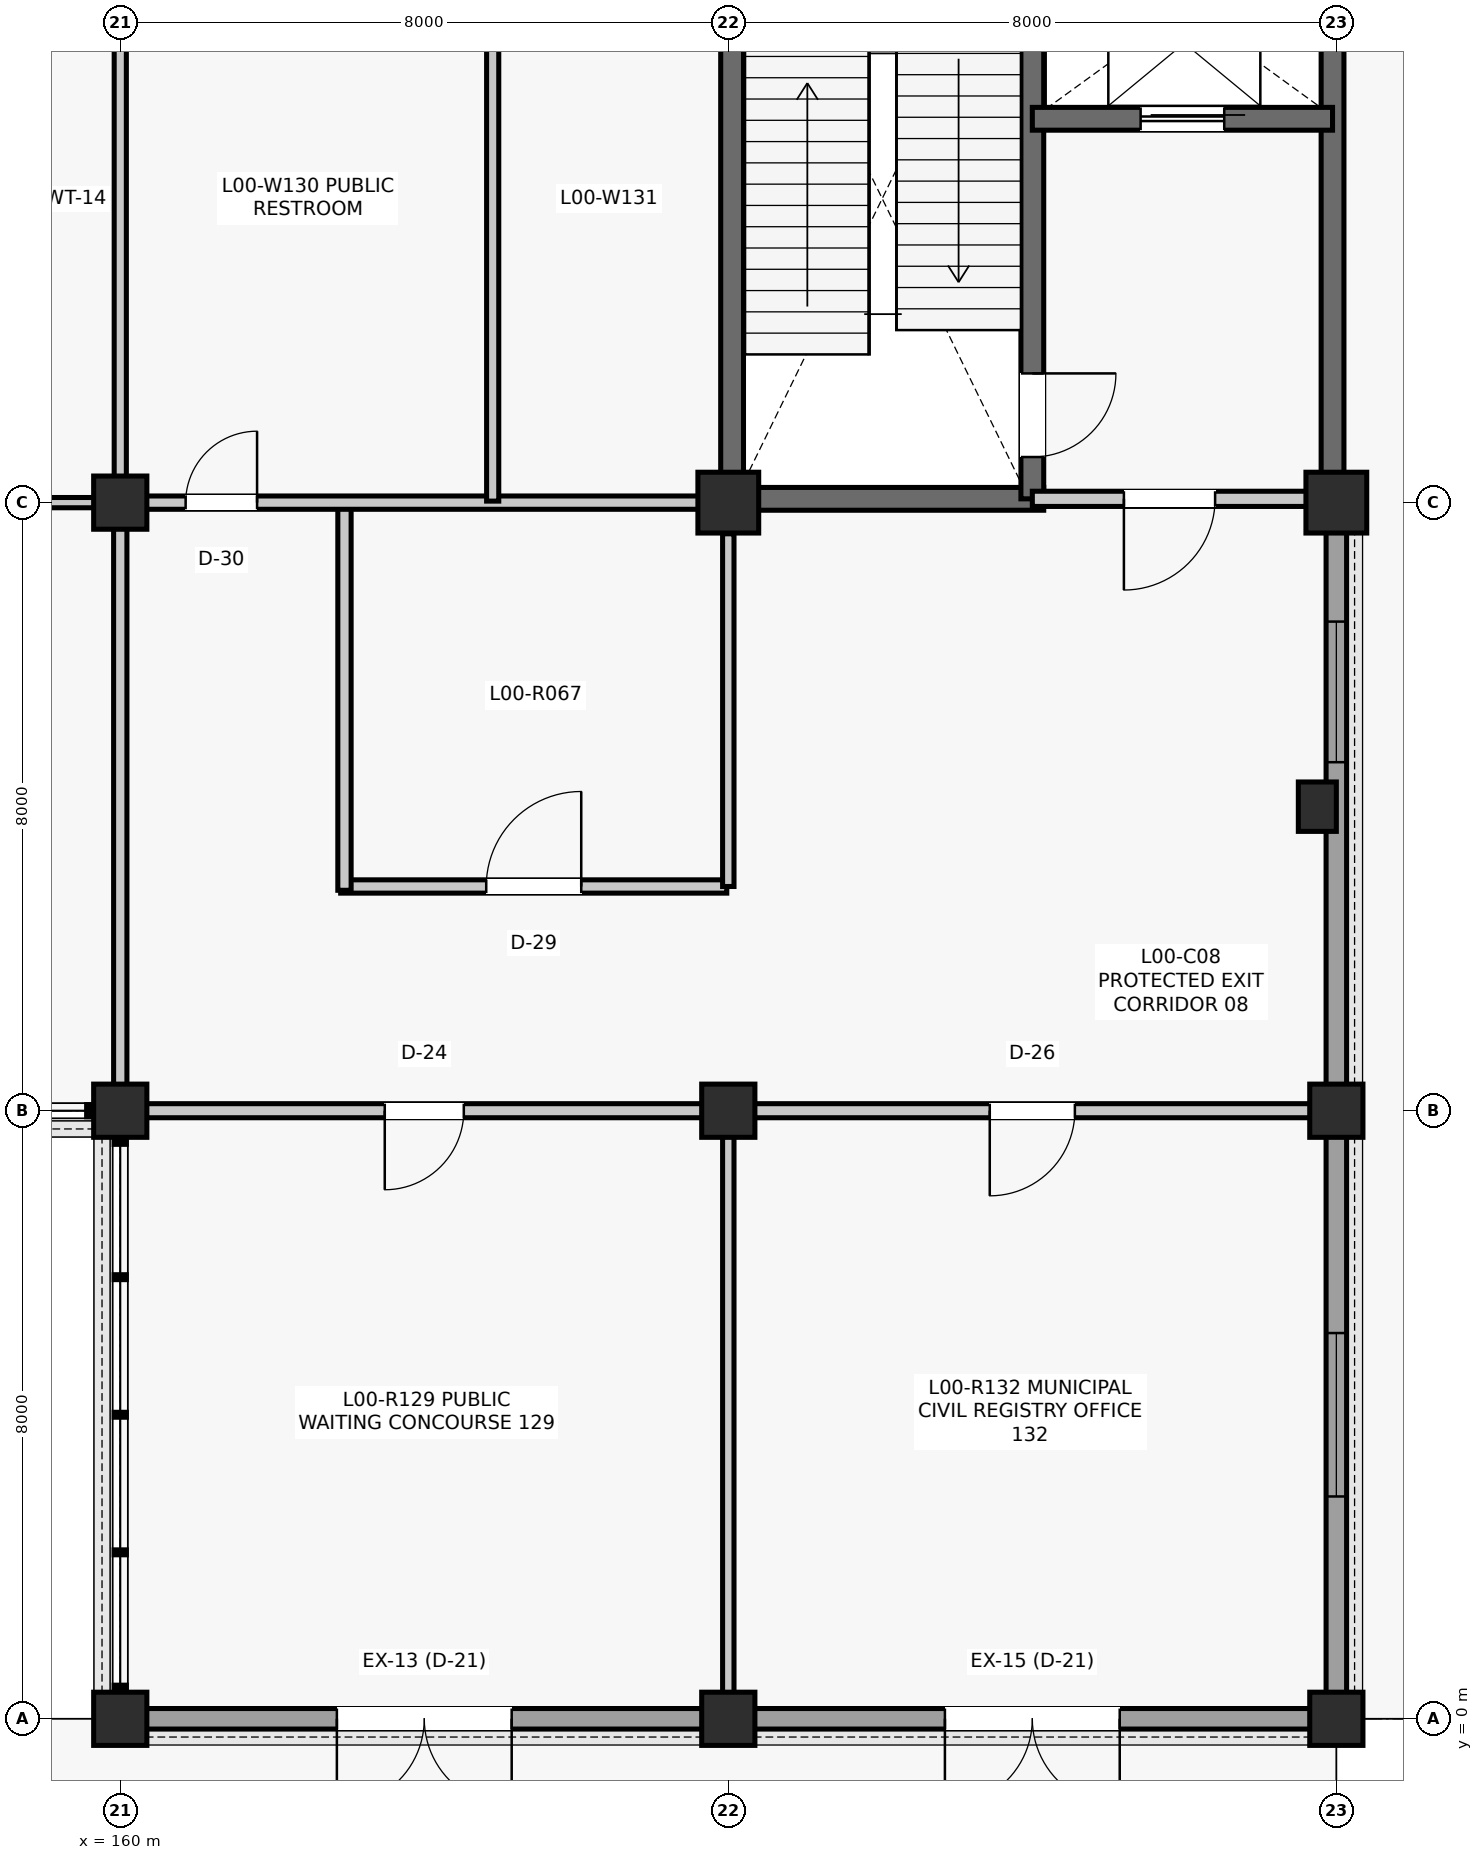
"""IFC4 building model, lengths in metres.
Left out: names, types, materials, properties, quantities, classifications, styles, units other than length and angle.
Written with IfcOpenShell. Run it as: python <this file> out.ifc"""

import sys

from ifc_helpers import new_model, si_unit, direction, frame, frame_2d, origin, origin_2d, place, context, subcontext, project, spatial, rectangle, extrude, element, fill, save


model = new_model("IFC4")
c1 = context("Model", 3, precision=1e-05, world=origin(), true_north=direction((0.0, 1.0)))
c2 = subcontext(c1, "Body", "Model", "MODEL_VIEW")
j1 = project(units=[si_unit("LENGTHUNIT", "METRE"), si_unit("PLANEANGLEUNIT", "RADIAN")], contexts=[c1])
p1 = place(None, origin())
s1 = spatial("IfcSite", under=j1, at=p1, CompositionType="ELEMENT")
p2 = place(p1, origin())
s2 = spatial("IfcBuilding", under=s1, at=p2, CompositionType="ELEMENT")
p3 = place(p2, origin())
s3 = spatial("IfcBuildingStorey", under=s2, at=p3, CompositionType="ELEMENT", Elevation=0.0)
for number, where, z_axis, x_axis in (
    (1, (160.0, 0.0, 0.0), (0.0, 0.0, 1.0), (1.0, 0.0, 0.0)),
    (2, (160.0, 8.0, 0.0), (0.0, 0.0, 1.0), (1.0, 0.0, 0.0)),
    (3, (160.0, 16.0, 0.0), (0.0, 0.0, 1.0), (1.0, 0.0, 0.0)),
    (4, (168.0, 0.0, 0.0), (0.0, 0.0, 1.0), (1.0, 0.0, 0.0)),
    (5, (168.0, 8.0, 0.0), (0.0, 0.0, 1.0), (1.0, 0.0, 0.0)),
):
    element("IfcColumn", number, at=place(p3, frame(where, z_axis=z_axis, x_axis=x_axis)), inside=s3, PredefinedType="COLUMN", context=c2, shape_type="SweptSolid", body=[
        extrude(rectangle(XDim=0.7, YDim=0.7, at=origin_2d()), origin(), (0.0, 0.0, 1.0), 5.28),
    ])
p4 = place(p3, frame((168.0, 16.0, 0.0), z_axis=(0.0, 0.0, 1.0), x_axis=(1.0, 0.0, 0.0)))
e6 = element("IfcColumn", 6, at=p4, inside=s3, PredefinedType="COLUMN", context=c2, shape_type="SweptSolid", body=[
    extrude(rectangle(XDim=0.8, YDim=0.8, at=origin_2d()), origin(), (0.0, 0.0, 1.0), 5.28),
])
for number, where, z_axis, x_axis in (
    (7, (176.0, 0.0, 0.0), (0.0, 0.0, 1.0), (1.0, 0.0, 0.0)),
    (8, (176.0, 8.0, 0.0), (0.0, 0.0, 1.0), (1.0, 0.0, 0.0)),
):
    element("IfcColumn", number, at=place(p3, frame(where, z_axis=z_axis, x_axis=x_axis)), inside=s3, PredefinedType="COLUMN", context=c2, shape_type="SweptSolid", body=[
        extrude(rectangle(XDim=0.7, YDim=0.7, at=origin_2d()), origin(), (0.0, 0.0, 1.0), 5.28),
    ])
p5 = place(p3, frame((176.0, 16.0, 0.0), z_axis=(0.0, 0.0, 1.0), x_axis=(1.0, 0.0, 0.0)))
e9 = element("IfcColumn", 9, at=p5, inside=s3, PredefinedType="COLUMN", context=c2, shape_type="SweptSolid", body=[
    extrude(rectangle(XDim=0.8, YDim=0.8, at=origin_2d()), origin(), (0.0, 0.0, 1.0), 5.28),
])
p6 = place(p3, frame((175.75, 12.0, 0.0), z_axis=(0.0, 0.0, 1.0), x_axis=(1.0, 0.0, 0.0)))
e10 = element("IfcColumn", 10, at=p6, inside=s3, PredefinedType="PILASTER", context=c2, shape_type="SweptSolid", body=[
    extrude(rectangle(XDim=0.5, YDim=0.65, at=origin_2d()), origin(), (0.0, 0.0, 1.0), 5.28),
])
p7 = place(p3, frame((160.335, 0.0, 0.0), z_axis=(0.0, 0.0, 1.0), x_axis=(1.0, 0.0, 0.0)))
e11 = element("IfcWall", 11, at=p7, inside=s3, PredefinedType="SOLIDWALL", context=c2, shape_type="SweptSolid", body=[
    extrude(rectangle(XDim=7.33, YDim=0.27, at=frame_2d((3.665, 0.0))), origin(), (0.0, 0.0, 1.0), 4.61),
])
p8 = place(p7, frame((2.515, 0.0, 0.0)))
e12 = element("IfcOpeningElement", 12, at=p8, cuts=e11, PredefinedType="OPENING", context=c2, shape_type="SweptSolid", body=[
    extrude(rectangle(XDim=2.3, YDim=2.55, at=frame_2d((1.15, 1.275))), frame((0.0, 0.145, 0.0), z_axis=(0.0, -1.0, 0.0), x_axis=(1.0, 0.0, 0.0)), (0.0, 0.0, 1.0), 0.29),
])
p9 = place(p3, frame((168.335, 0.0, 0.0), z_axis=(0.0, 0.0, 1.0), x_axis=(1.0, 0.0, 0.0)))
e13 = element("IfcWall", 13, at=p9, inside=s3, PredefinedType="SOLIDWALL", context=c2, shape_type="SweptSolid", body=[
    extrude(rectangle(XDim=7.33, YDim=0.27, at=frame_2d((3.665, 0.0))), origin(), (0.0, 0.0, 1.0), 4.674),
])
p10 = place(p9, frame((2.515, 0.0, 0.0)))
e14 = element("IfcOpeningElement", 14, at=p10, cuts=e13, PredefinedType="OPENING", context=c2, shape_type="SweptSolid", body=[
    extrude(rectangle(XDim=2.3, YDim=2.55, at=frame_2d((1.15, 1.275))), frame((0.0, 0.145, 0.0), z_axis=(0.0, -1.0, 0.0), x_axis=(1.0, 0.0, 0.0)), (0.0, 0.0, 1.0), 0.29),
])
p11 = place(p3, frame((176.0, 0.335, 0.0), z_axis=(0.0, 0.0, 1.0), x_axis=(0.0, 1.0, 0.0)))
e15 = element("IfcWall", 15, at=p11, inside=s3, PredefinedType="SOLIDWALL", context=c2, shape_type="SweptSolid", body=[
    extrude(rectangle(XDim=7.33, YDim=0.27, at=frame_2d((3.665, 0.0))), origin(), (0.0, 0.0, 1.0), 4.614),
])
p12 = place(p11, frame((2.59, 0.0, 0.9)))
e16 = element("IfcOpeningElement", 16, at=p12, cuts=e15, PredefinedType="OPENING", context=c2, shape_type="SweptSolid", body=[
    extrude(rectangle(XDim=2.15, YDim=2.8, at=frame_2d((1.075, 1.4))), frame((0.0, 0.145, 0.0), z_axis=(0.0, -1.0, 0.0), x_axis=(1.0, 0.0, 0.0)), (0.0, 0.0, 1.0), 0.29),
])
p13 = place(p3, frame((176.0, 8.335, 0.0), z_axis=(0.0, 0.0, 1.0), x_axis=(0.0, 1.0, 0.0)))
e17 = element("IfcWall", 17, at=p13, inside=s3, PredefinedType="SOLIDWALL", context=c2, shape_type="SweptSolid", body=[
    extrude(rectangle(XDim=7.28, YDim=0.27, at=frame_2d((3.64, 0.0))), origin(), (0.0, 0.0, 1.0), 4.677),
])
p14 = place(p13, frame((4.25, 0.0, 0.9)))
e18 = element("IfcOpeningElement", 18, at=p14, cuts=e17, PredefinedType="OPENING", context=c2, shape_type="SweptSolid", body=[
    extrude(rectangle(XDim=1.85, YDim=2.65, at=frame_2d((0.925, 1.325))), frame((0.0, 0.145, 0.0), z_axis=(0.0, -1.0, 0.0), x_axis=(1.0, 0.0, 0.0)), (0.0, 0.0, 1.0), 0.29),
])
for number, where, z_axis, x_axis in (
    (19, (168.05, 16.29, 0.0), (0.0, 0.0, 1.0), (0.0, 1.0, 0.0)),
    (20, (175.95, 16.29, 0.0), (0.0, 0.0, 1.0), (0.0, 1.0, 0.0)),
):
    element("IfcWall", number, at=place(p3, frame(where, z_axis=z_axis, x_axis=x_axis)), inside=s3, PredefinedType="SHEAR", context=c2, shape_type="SweptSolid", body=[
        extrude(rectangle(XDim=7.42, YDim=0.3, at=frame_2d((3.71, 0.0))), origin(), (0.0, 0.0, 1.0), 5.035),
    ])
p15 = place(p3, frame((168.29, 16.05, 0.0), z_axis=(0.0, 0.0, 1.0), x_axis=(1.0, 0.0, 0.0)))
e21 = element("IfcWall", 21, at=p15, inside=s3, PredefinedType="SHEAR", context=c2, shape_type="SweptSolid", body=[
    extrude(rectangle(XDim=3.86, YDim=0.3, at=frame_2d((1.93, 0.0))), origin(), (0.0, 0.0, 1.0), 5.035),
])
p16 = place(p3, frame((172.0, 16.05, 0.0), z_axis=(0.0, 0.0, 1.0), x_axis=(0.0, 1.0, 0.0)))
e22 = element("IfcWall", 22, at=p16, inside=s3, PredefinedType="SHEAR", context=c2, shape_type="SweptSolid", body=[
    extrude(rectangle(XDim=7.9, YDim=0.3, at=frame_2d((3.95, 0.0))), origin(), (0.0, 0.0, 1.0), 5.035),
])
p17 = place(p16, frame((0.55, 0.0, 0.0)))
e23 = element("IfcOpeningElement", 23, at=p17, cuts=e22, PredefinedType="OPENING", context=c2, shape_type="SweptSolid", body=[
    extrude(rectangle(XDim=1.1, YDim=2.15, at=frame_2d((0.55, 1.075))), frame((0.0, 0.16, 0.0), z_axis=(0.0, -1.0, 0.0), x_axis=(1.0, 0.0, 0.0)), (0.0, 0.0, 1.0), 0.32),
])
p18 = place(p3, frame((172.0, 21.05, 0.0), z_axis=(0.0, 0.0, 1.0), x_axis=(1.0, 0.0, 0.0)))
e24 = element("IfcWall", 24, at=p18, inside=s3, PredefinedType="SHEAR", context=c2, shape_type="SweptSolid", body=[
    extrude(rectangle(XDim=3.95, YDim=0.3, at=frame_2d((1.975, 0.0))), origin(), (0.0, 0.0, 1.0), 5.035),
])
p19 = place(p18, frame((1.425, 0.0, 0.0)))
e25 = element("IfcOpeningElement", 25, at=p19, cuts=e24, PredefinedType="OPENING", context=c2, shape_type="SweptSolid", body=[
    extrude(rectangle(XDim=1.1, YDim=2.2, at=frame_2d((0.55, 1.1))), frame((0.0, 0.16, 0.0), z_axis=(0.0, -1.0, 0.0), x_axis=(1.0, 0.0, 0.0)), (0.0, 0.0, 1.0), 0.32),
])
p20 = place(p3, frame((172.0, 16.05, 0.0), z_axis=(0.0, 0.0, 1.0), x_axis=(1.0, 0.0, 0.0)))
e26 = element("IfcWall", 26, at=p20, inside=s3, PredefinedType="PARTITIONING", context=c2, shape_type="SweptSolid", body=[
    extrude(rectangle(XDim=3.61, YDim=0.2, at=frame_2d((1.805, 0.0))), origin(), (0.0, 0.0, 1.0), 4.404),
])
p21 = place(p20, frame((1.205, 0.0, 0.0)))
e27 = element("IfcOpeningElement", 27, at=p21, cuts=e26, PredefinedType="OPENING", context=c2, shape_type="SweptSolid", body=[
    extrude(rectangle(XDim=1.2, YDim=2.15, at=frame_2d((0.6, 1.075))), frame((0.0, 0.11, 0.0), z_axis=(0.0, -1.0, 0.0), x_axis=(1.0, 0.0, 0.0)), (0.0, 0.0, 1.0), 0.22),
])
p22 = place(p3, frame((162.9, 10.95, 0.0), z_axis=(0.0, 0.0, 1.0), x_axis=(1.0, 0.0, 0.0)))
e28 = element("IfcWall", 28, at=p22, inside=s3, PredefinedType="PARTITIONING", context=c2, shape_type="SweptSolid", body=[
    extrude(rectangle(XDim=5.08, YDim=0.175, at=frame_2d((2.54, 0.0))), origin(), (0.0, 0.0, 1.0), 4.404),
])
p23 = place(p22, frame((1.915, 0.0, 0.0)))
e29 = element("IfcOpeningElement", 29, at=p23, cuts=e28, PredefinedType="OPENING", context=c2, shape_type="SweptSolid", body=[
    extrude(rectangle(XDim=1.25, YDim=2.18, at=frame_2d((0.625, 1.09))), frame((0.0, 0.097, 0.0), z_axis=(0.0, -1.0, 0.0), x_axis=(1.0, 0.0, 0.0)), (0.0, 0.0, 1.0), 0.195),
])
p24 = place(p3, frame((162.95, 10.9, 0.0), z_axis=(0.0, 0.0, 1.0), x_axis=(0.0, 1.0, 0.0)))
e30 = element("IfcWall", 30, at=p24, inside=s3, PredefinedType="PARTITIONING", context=c2, shape_type="SweptSolid", body=[
    extrude(rectangle(XDim=5.08, YDim=0.175, at=frame_2d((2.54, 0.0))), origin(), (0.0, 0.0, 1.0), 4.336),
])
p25 = place(p3, frame((168.0, 10.95, 0.0), z_axis=(0.0, 0.0, 1.0), x_axis=(0.0, 1.0, 0.0)))
e31 = element("IfcWall", 31, at=p25, inside=s3, PredefinedType="PARTITIONING", context=c2, shape_type="SweptSolid", body=[
    extrude(rectangle(XDim=4.64, YDim=0.15, at=frame_2d((2.32, 0.0))), origin(), (0.0, 0.0, 1.0), 4.404),
])
p26 = place(p3, frame((160.0, 8.34, 0.0), z_axis=(0.0, 0.0, 1.0), x_axis=(0.0, 1.0, 0.0)))
e32 = element("IfcWall", 32, at=p26, inside=s3, PredefinedType="PARTITIONING", context=c2, shape_type="SweptSolid", body=[
    extrude(rectangle(XDim=7.32, YDim=0.175, at=frame_2d((3.66, 0.0))), origin(), (0.0, 0.0, 1.0), 4.412),
])
p27 = place(p3, frame((152.34, 16.0, 0.0), z_axis=(0.0, 0.0, 1.0), x_axis=(1.0, 0.0, 0.0)))
e33 = element("IfcWall", 33, at=p27, inside=s3, PredefinedType="PARTITIONING", context=c2, shape_type="SweptSolid", body=[
    extrude(rectangle(XDim=7.32, YDim=0.135, at=frame_2d((3.66, 0.0))), origin(), (0.0, 0.0, 1.0), 4.667),
])
p28 = place(p3, frame((160.0, 16.34, 0.0), z_axis=(0.0, 0.0, 1.0), x_axis=(0.0, 1.0, 0.0)))
e34 = element("IfcWall", 34, at=p28, inside=s3, PredefinedType="PARTITIONING", context=c2, shape_type="SweptSolid", body=[
    extrude(rectangle(XDim=7.32, YDim=0.16, at=frame_2d((3.66, 0.0))), origin(), (0.0, 0.0, 1.0), 4.607),
])
p29 = place(p3, frame((168.0, 0.34, 0.0), z_axis=(0.0, 0.0, 1.0), x_axis=(0.0, 1.0, 0.0)))
e35 = element("IfcWall", 35, at=p29, inside=s3, PredefinedType="PARTITIONING", context=c2, shape_type="SweptSolid", body=[
    extrude(rectangle(XDim=7.32, YDim=0.15, at=frame_2d((3.66, 0.0))), origin(), (0.0, 0.0, 1.0), 4.412),
])
p30 = place(p3, frame((160.34, 8.0, 0.0), z_axis=(0.0, 0.0, 1.0), x_axis=(1.0, 0.0, 0.0)))
e36 = element("IfcWall", 36, at=p30, inside=s3, PredefinedType="PARTITIONING", context=c2, shape_type="SweptSolid", body=[
    extrude(rectangle(XDim=7.32, YDim=0.185, at=frame_2d((3.66, 0.0))), origin(), (0.0, 0.0, 1.0), 4.403),
])
p31 = place(p30, frame((3.14, 0.0, 0.0)))
e37 = element("IfcOpeningElement", 37, at=p31, cuts=e36, PredefinedType="OPENING", context=c2, shape_type="SweptSolid", body=[
    extrude(rectangle(XDim=1.04, YDim=2.18, at=frame_2d((0.52, 1.09))), frame((0.0, 0.103, 0.0), z_axis=(0.0, -1.0, 0.0), x_axis=(1.0, 0.0, 0.0)), (0.0, 0.0, 1.0), 0.205),
])
p32 = place(p3, frame((160.34, 16.0, 0.0), z_axis=(0.0, 0.0, 1.0), x_axis=(1.0, 0.0, 0.0)))
e38 = element("IfcWall", 38, at=p32, inside=s3, PredefinedType="PARTITIONING", context=c2, shape_type="SweptSolid", body=[
    extrude(rectangle(XDim=7.27, YDim=0.175, at=frame_2d((3.635, 0.0))), origin(), (0.0, 0.0, 1.0), 4.336),
])
p33 = place(p32, frame((0.52, 0.0, 0.0)))
e39 = element("IfcOpeningElement", 39, at=p33, cuts=e38, PredefinedType="OPENING", context=c2, shape_type="SweptSolid", body=[
    extrude(rectangle(XDim=0.94, YDim=2.12, at=frame_2d((0.47, 1.06))), frame((0.0, 0.097, 0.0), z_axis=(0.0, -1.0, 0.0), x_axis=(1.0, 0.0, 0.0)), (0.0, 0.0, 1.0), 0.195),
])
p34 = place(p3, frame((168.34, 8.0, 0.0), z_axis=(0.0, 0.0, 1.0), x_axis=(1.0, 0.0, 0.0)))
e40 = element("IfcWall", 40, at=p34, inside=s3, PredefinedType="PARTITIONING", context=c2, shape_type="SweptSolid", body=[
    extrude(rectangle(XDim=7.32, YDim=0.185, at=frame_2d((3.66, 0.0))), origin(), (0.0, 0.0, 1.0), 4.336),
])
p35 = place(p34, frame((3.1, 0.0, 0.0)))
e41 = element("IfcOpeningElement", 41, at=p35, cuts=e40, PredefinedType="OPENING", context=c2, shape_type="SweptSolid", body=[
    extrude(rectangle(XDim=1.12, YDim=2.22, at=frame_2d((0.56, 1.11))), frame((0.0, 0.103, 0.0), z_axis=(0.0, -1.0, 0.0), x_axis=(1.0, 0.0, 0.0)), (0.0, 0.0, 1.0), 0.205),
])
p36 = place(p3, frame((164.9, 16.02, 0.0), z_axis=(0.0, 0.0, 1.0), x_axis=(0.0, 1.0, 0.0)))
e42 = element("IfcWall", 42, at=p36, inside=s3, PredefinedType="PARTITIONING", context=c2, shape_type="SweptSolid", body=[
    extrude(rectangle(XDim=7.96, YDim=0.16, at=frame_2d((3.98, 0.0))), origin(), (0.0, 0.0, 1.0), 4.336),
])
p37 = place(p8, frame((2.3, 0.0, 0.0), z_axis=(0.0, 0.0, 1.0), x_axis=(-1.0, 0.0, 0.0)))
e43 = element("IfcDoor", 43, at=p37, inside=s3, OperationType="DOUBLE_DOOR_SINGLE_SWING", PredefinedType="DOOR", context=c2, shape_type="SweptSolid", body=[
    extrude(rectangle(XDim=2.3, YDim=2.55, at=frame_2d((1.15, 1.275))), frame((0.0, 0.025, 0.0), z_axis=(0.0, -1.0, 0.0), x_axis=(1.0, 0.0, 0.0)), (0.0, 0.0, 1.0), 0.05),
])
fill(e12, e43)
p38 = place(p10, frame((2.3, 0.0, 0.0), z_axis=(0.0, 0.0, 1.0), x_axis=(-1.0, 0.0, 0.0)))
e44 = element("IfcDoor", 44, at=p38, inside=s3, OperationType="DOUBLE_DOOR_SINGLE_SWING", PredefinedType="DOOR", context=c2, shape_type="SweptSolid", body=[
    extrude(rectangle(XDim=2.3, YDim=2.55, at=frame_2d((1.15, 1.275))), frame((0.0, 0.025, 0.0), z_axis=(0.0, -1.0, 0.0), x_axis=(1.0, 0.0, 0.0)), (0.0, 0.0, 1.0), 0.05),
])
fill(e14, e44)
p39 = place(p12, origin())
e45 = element("IfcWindow", 45, at=p39, inside=s3, PartitioningType="SINGLE_PANEL", PredefinedType="WINDOW", context=c2, shape_type="SweptSolid", body=[
    extrude(rectangle(XDim=2.15, YDim=2.8, at=frame_2d((1.075, 1.4))), frame((0.0, 0.03, 0.0), z_axis=(0.0, -1.0, 0.0), x_axis=(1.0, 0.0, 0.0)), (0.0, 0.0, 1.0), 0.06),
])
fill(e16, e45)
p40 = place(p14, origin())
e46 = element("IfcWindow", 46, at=p40, inside=s3, PartitioningType="SINGLE_PANEL", PredefinedType="WINDOW", context=c2, shape_type="SweptSolid", body=[
    extrude(rectangle(XDim=1.85, YDim=2.65, at=frame_2d((0.925, 1.325))), frame((0.0, 0.03, 0.0), z_axis=(0.0, -1.0, 0.0), x_axis=(1.0, 0.0, 0.0)), (0.0, 0.0, 1.0), 0.06),
])
fill(e18, e46)
p41 = place(p17, frame((1.1, 0.0, 0.0), z_axis=(0.0, 0.0, 1.0), x_axis=(-1.0, 0.0, 0.0)))
e47 = element("IfcDoor", 47, at=p41, inside=s3, OperationType="SINGLE_SWING_RIGHT", PredefinedType="DOOR", context=c2, shape_type="SweptSolid", body=[
    extrude(rectangle(XDim=1.1, YDim=2.15, at=frame_2d((0.55, 1.075))), frame((0.0, 0.025, 0.0), z_axis=(0.0, -1.0, 0.0), x_axis=(1.0, 0.0, 0.0)), (0.0, 0.0, 1.0), 0.05),
])
fill(e23, e47)
p42 = place(p19, origin())
e48 = element("IfcDoor", 48, at=p42, inside=s3, OperationType="SLIDING_TO_LEFT", PredefinedType="DOOR", context=c2, shape_type="SweptSolid", body=[
    extrude(rectangle(XDim=1.1, YDim=2.2, at=frame_2d((0.55, 1.1))), frame((0.0, 0.025, 0.0), z_axis=(0.0, -1.0, 0.0), x_axis=(1.0, 0.0, 0.0)), (0.0, 0.0, 1.0), 0.05),
])
fill(e25, e48)
p43 = place(p21, frame((1.2, 0.0, 0.0), z_axis=(0.0, 0.0, 1.0), x_axis=(-1.0, 0.0, 0.0)))
e49 = element("IfcDoor", 49, at=p43, inside=s3, OperationType="SINGLE_SWING_LEFT", PredefinedType="DOOR", context=c2, shape_type="SweptSolid", body=[
    extrude(rectangle(XDim=1.2, YDim=2.15, at=frame_2d((0.6, 1.075))), frame((0.0, 0.025, 0.0), z_axis=(0.0, -1.0, 0.0), x_axis=(1.0, 0.0, 0.0)), (0.0, 0.0, 1.0), 0.05),
])
fill(e27, e49)
p44 = place(p23, origin())
e50 = element("IfcDoor", 50, at=p44, inside=s3, OperationType="SINGLE_SWING_RIGHT", PredefinedType="DOOR", context=c2, shape_type="SweptSolid", body=[
    extrude(rectangle(XDim=1.25, YDim=2.18, at=frame_2d((0.625, 1.09))), frame((0.0, 0.025, 0.0), z_axis=(0.0, -1.0, 0.0), x_axis=(1.0, 0.0, 0.0)), (0.0, 0.0, 1.0), 0.05),
])
fill(e29, e50)
p45 = place(p31, frame((1.04, 0.0, 0.0), z_axis=(0.0, 0.0, 1.0), x_axis=(-1.0, 0.0, 0.0)))
e51 = element("IfcDoor", 51, at=p45, inside=s3, OperationType="SINGLE_SWING_LEFT", PredefinedType="DOOR", context=c2, shape_type="SweptSolid", body=[
    extrude(rectangle(XDim=1.04, YDim=2.18, at=frame_2d((0.52, 1.09))), frame((0.0, 0.025, 0.0), z_axis=(0.0, -1.0, 0.0), x_axis=(1.0, 0.0, 0.0)), (0.0, 0.0, 1.0), 0.05),
])
fill(e37, e51)
p46 = place(p33, origin())
e52 = element("IfcDoor", 52, at=p46, inside=s3, OperationType="SINGLE_SWING_RIGHT", PredefinedType="DOOR", context=c2, shape_type="SweptSolid", body=[
    extrude(rectangle(XDim=0.94, YDim=2.12, at=frame_2d((0.47, 1.06))), frame((0.0, 0.025, 0.0), z_axis=(0.0, -1.0, 0.0), x_axis=(1.0, 0.0, 0.0)), (0.0, 0.0, 1.0), 0.05),
])
fill(e39, e52)
p47 = place(p35, frame((1.12, 0.0, 0.0), z_axis=(0.0, 0.0, 1.0), x_axis=(-1.0, 0.0, 0.0)))
e53 = element("IfcDoor", 53, at=p47, inside=s3, OperationType="SINGLE_SWING_LEFT", PredefinedType="DOOR", context=c2, shape_type="SweptSolid", body=[
    extrude(rectangle(XDim=1.12, YDim=2.22, at=frame_2d((0.56, 1.11))), frame((0.0, 0.025, 0.0), z_axis=(0.0, -1.0, 0.0), x_axis=(1.0, 0.0, 0.0)), (0.0, 0.0, 1.0), 0.05),
])
fill(e41, e53)
save(model, sys.argv[1])
